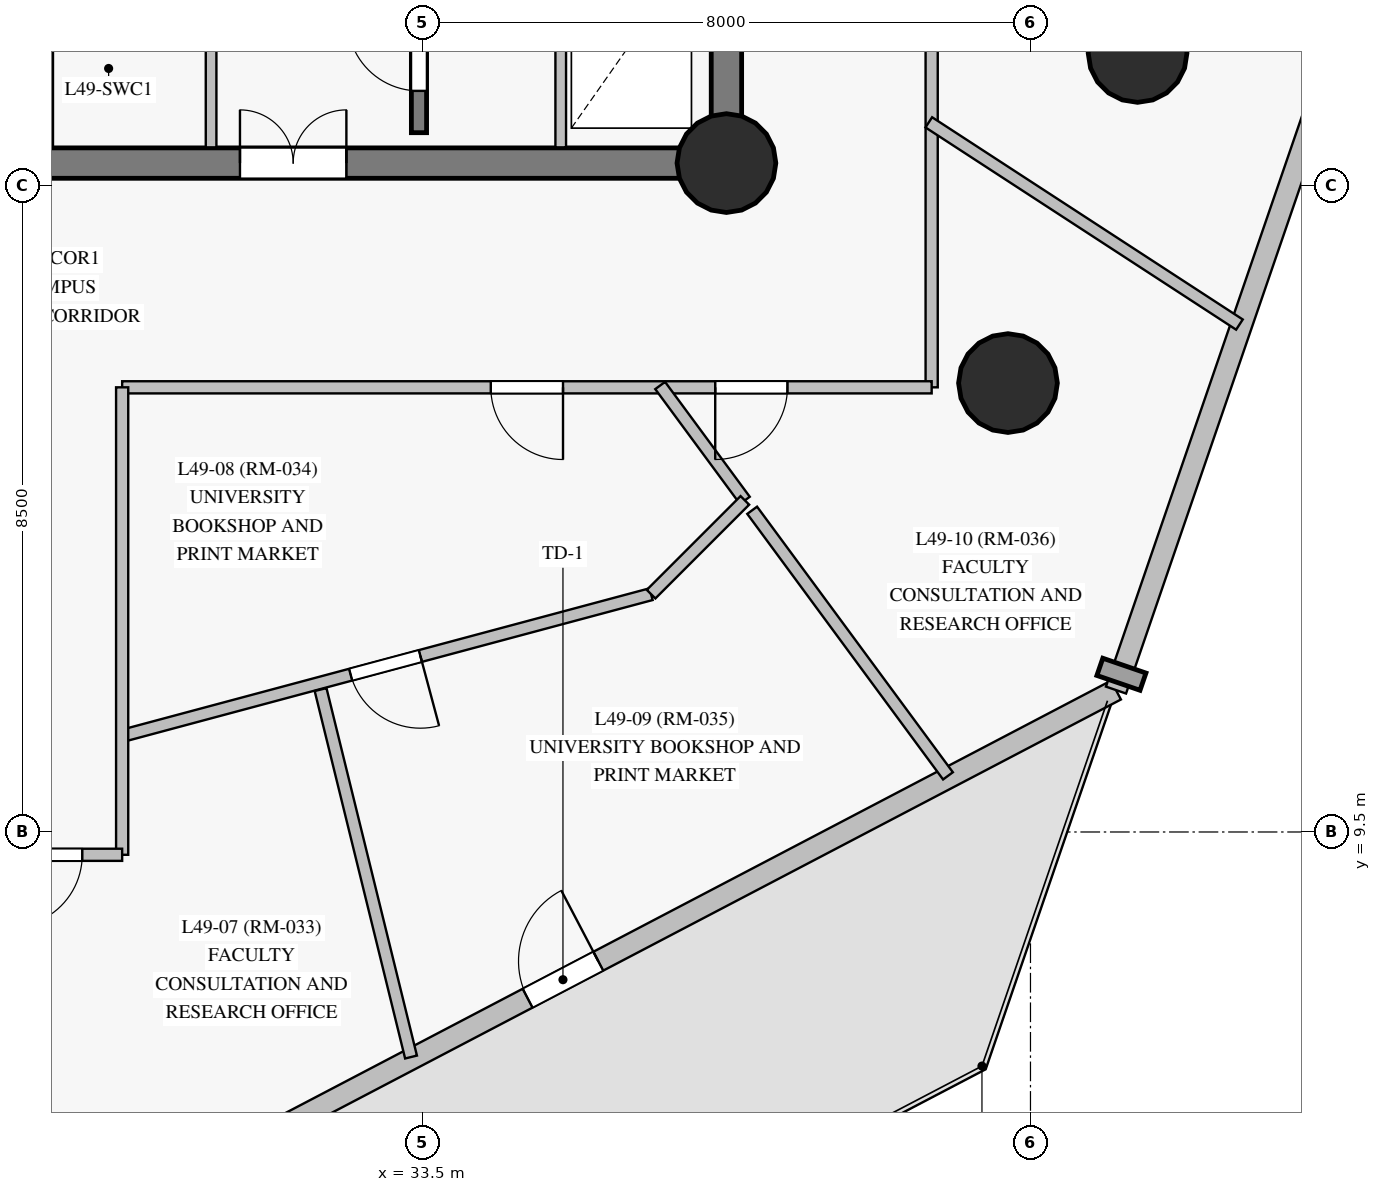
"""IFC4 building model, lengths in metres.
Left out: names, types, materials, properties, quantities, classifications, styles, units other than length and angle.
Written with IfcOpenShell. Run it as: python <this file> out.ifc"""

import sys

from ifc_helpers import new_model, si_unit, direction, frame, frame_2d, origin, origin_with_axes, origin_2d, place, context, subcontext, project, spatial, rectangle, circle, extrude, source, transform, mapped, element, fill, save


model = new_model("IFC4")
c1 = context("Model", 3, precision=1e-05, world=origin(), true_north=direction((0.0, 1.0)))
c2 = subcontext(c1, "Body", "Model", "MODEL_VIEW")
j1 = project(units=[si_unit("LENGTHUNIT", "METRE"), si_unit("PLANEANGLEUNIT", "RADIAN")], contexts=[c1])
p1 = place(None, origin())
s1 = spatial("IfcSite", under=j1, at=p1, CompositionType="ELEMENT")
p2 = place(p1, origin())
s2 = spatial("IfcBuilding", under=s1, at=p2, CompositionType="ELEMENT")
p3 = place(p2, frame((0.0, 0.0, 171.8)))
s3 = spatial("IfcBuildingStorey", under=s2, at=p3, CompositionType="ELEMENT", Elevation=171.8)
p4 = place(p3, frame((26.55, 18.3, 0.0), z_axis=(0.0, 0.0, 1.0), x_axis=(1.0, 0.0, 0.0)))
e1 = element("IfcWall", 1, at=p4, inside=s3, PredefinedType="SHEAR", context=c2, shape_type="SweptSolid", body=[
    extrude(rectangle(XDim=10.95, YDim=0.4, at=frame_2d((5.475, 0.0))), origin(), (0.0, 0.0, 1.0), 2.825),
])
p5 = place(p4, frame((4.55, 0.0, 0.0)))
e2 = element("IfcOpeningElement", 2, at=p5, cuts=e1, PredefinedType="OPENING", context=c2, shape_type="SweptSolid", body=[
    extrude(rectangle(XDim=1.4, YDim=2.2, at=frame_2d((0.7, 1.1))), frame((0.0, 0.21, 0.0), z_axis=(0.0, -1.0, 0.0), x_axis=(1.0, 0.0, 0.0)), (0.0, 0.0, 1.0), 0.42),
])
p6 = place(p3, frame((37.5, 18.3, 0.0), z_axis=(0.0, 0.0, 1.0), x_axis=(0.0, 1.0, 0.0)))
e3 = element("IfcWall", 3, at=p6, inside=s3, PredefinedType="SHEAR", context=c2, shape_type="SweptSolid", body=[
    extrude(rectangle(XDim=16.4, YDim=0.4, at=frame_2d((8.2, 0.0))), origin(), (0.0, 0.0, 1.0), 2.825),
])
p7 = place(p6, frame((14.15, 0.0, 0.0)))
e4 = element("IfcOpeningElement", 4, at=p7, cuts=e3, PredefinedType="OPENING", context=c2, shape_type="SweptSolid", body=[
    extrude(rectangle(XDim=1.2, YDim=2.15, at=frame_2d((0.6, 1.075))), frame((0.0, 0.21, 0.0), z_axis=(0.0, -1.0, 0.0), x_axis=(1.0, 0.0, 0.0)), (0.0, 0.0, 1.0), 0.42),
])
m1 = source(origin_with_axes(), c2, "Body", "SweptSolid", [
    extrude(circle(Radius=0.65, at=origin_2d()), origin(), (0.0, 0.0, 1.0), 3.05),
])
for number, where, z_axis, x_axis in (
    (5, (37.5, 18.3, 0.0), (0.0, 0.0, 1.0), (1.0, 0.0, 0.0)),
    (6, (42.909, 19.749, 0.0), (0.0, 0.0, 1.0), (1.0, 0.0, 0.0)),
    (7, (41.204, 15.406, 0.0), (0.0, 0.0, 1.0), (1.0, 0.0, 0.0)),
):
    element("IfcColumn", number, at=place(p3, frame(where, z_axis=z_axis, x_axis=x_axis)), inside=s3, PredefinedType="COLUMN", context=c2, shape_type="MappedRepresentation", body=[
        mapped(m1, transform((0.0, 0.0, 0.0), scale=1.0)),
    ])
p8 = place(p3, frame((26.751, 3.054, 0.0), z_axis=(0.0, 0.0, 1.0), x_axis=(0.885874198796, 0.463925537029, 0.0)))
e8 = element("IfcWall", 8, at=p8, inside=s3, PredefinedType="SOLIDWALL", context=c2, shape_type="SweptSolid", body=[
    extrude(rectangle(XDim=17.919, YDim=0.28, at=frame_2d((8.96, 0.0))), origin(), (0.0, 0.0, 1.0), 2.495),
])
p9 = place(p8, frame((9.181, 0.0, 0.0)))
e9 = element("IfcOpeningElement", 9, at=p9, cuts=e8, PredefinedType="OPENING", context=c2, shape_type="SweptSolid", body=[
    extrude(rectangle(XDim=1.05, YDim=2.12, at=frame_2d((0.525, 1.06))), frame((0.0, 0.15, 0.0), z_axis=(0.0, -1.0, 0.0), x_axis=(1.0, 0.0, 0.0)), (0.0, 0.0, 1.0), 0.3),
])
p10 = place(p3, frame((42.625, 11.367, 0.0), z_axis=(0.0, 0.0, 1.0), x_axis=(0.324982030771, 0.945720191006, 0.0)))
e10 = element("IfcWall", 10, at=p10, inside=s3, PredefinedType="SOLIDWALL", context=c2, shape_type="SweptSolid", body=[
    extrude(rectangle(XDim=8.796, YDim=0.28, at=frame_2d((4.398, 0.0))), origin(), (0.0, 0.0, 1.0), 2.495),
])
p11 = place(p3, frame((33.455, 18.7, 0.0), z_axis=(0.0, 0.0, 1.0), x_axis=(0.0, 1.0, 0.0)))
e11 = element("IfcWall", 11, at=p11, inside=s3, PredefinedType="SHEAR", context=c2, shape_type="SweptSolid", body=[
    extrude(rectangle(XDim=15.6, YDim=0.2, at=frame_2d((7.8, 0.0))), origin(), (0.0, 0.0, 1.0), 2.825),
])
p12 = place(p11, frame((2.75, 0.0, 0.0)))
e12 = element("IfcOpeningElement", 12, at=p12, cuts=e11, PredefinedType="OPENING", context=c2, shape_type="SweptSolid", body=[
    extrude(rectangle(XDim=1.15, YDim=2.15, at=frame_2d((0.575, 1.075))), frame((0.0, 0.11, 0.0), z_axis=(0.0, -1.0, 0.0), x_axis=(1.0, 0.0, 0.0)), (0.0, 0.0, 1.0), 0.22),
])
p13 = place(p11, frame((0.55, 0.0, 0.0)))
e13 = element("IfcOpeningElement", 13, at=p13, cuts=e11, PredefinedType="OPENING", context=c2, shape_type="SweptSolid", body=[
    extrude(rectangle(XDim=0.94, YDim=2.1, at=frame_2d((0.47, 1.05))), frame((0.0, 0.11, 0.0), z_axis=(0.0, -1.0, 0.0), x_axis=(1.0, 0.0, 0.0)), (0.0, 0.0, 1.0), 0.22),
])
p14 = place(p3, frame((40.2, 37.65, 0.0), z_axis=(0.0, 0.0, 1.0), x_axis=(0.0, -1.0, 0.0)))
e14 = element("IfcWall", 14, at=p14, inside=s3, PredefinedType="PARTITIONING", context=c2, shape_type="SweptSolid", body=[
    extrude(rectangle(XDim=22.3, YDim=0.16, at=frame_2d((11.15, 0.0))), origin(), (0.0, 0.0, 1.0), 2.375),
])
p15 = place(p14, frame((14.02, 0.0, 0.0)))
e15 = element("IfcOpeningElement", 15, at=p15, cuts=e14, PredefinedType="OPENING", context=c2, shape_type="SweptSolid", body=[
    extrude(rectangle(XDim=0.95, YDim=2.15, at=frame_2d((0.475, 1.075))), frame((0.0, 0.09, 0.0), z_axis=(0.0, -1.0, 0.0), x_axis=(1.0, 0.0, 0.0)), (0.0, 0.0, 1.0), 0.18),
])
p16 = place(p14, frame((10.675, 0.0, 0.0)))
e16 = element("IfcOpeningElement", 16, at=p16, cuts=e14, PredefinedType="OPENING", context=c2, shape_type="SweptSolid", body=[
    extrude(rectangle(XDim=0.95, YDim=2.15, at=frame_2d((0.475, 1.075))), frame((0.0, 0.09, 0.0), z_axis=(0.0, -1.0, 0.0), x_axis=(1.0, 0.0, 0.0)), (0.0, 0.0, 1.0), 0.18),
])
p17 = place(p14, frame((7.33, 0.0, 0.0)))
e17 = element("IfcOpeningElement", 17, at=p17, cuts=e14, PredefinedType="OPENING", context=c2, shape_type="SweptSolid", body=[
    extrude(rectangle(XDim=0.95, YDim=2.15, at=frame_2d((0.475, 1.075))), frame((0.0, 0.09, 0.0), z_axis=(0.0, -1.0, 0.0), x_axis=(1.0, 0.0, 0.0)), (0.0, 0.0, 1.0), 0.18),
])
p18 = place(p3, frame((40.2, 15.35, 0.0), z_axis=(0.0, 0.0, 1.0), x_axis=(-1.0, 0.0, 0.0)))
e18 = element("IfcWall", 18, at=p18, inside=s3, PredefinedType="PARTITIONING", context=c2, shape_type="SweptSolid", body=[
    extrude(rectangle(XDim=10.65, YDim=0.16, at=frame_2d((5.325, 0.0))), origin(), (0.0, 0.0, 1.0), 2.275),
])
p19 = place(p18, frame((4.85, 0.0, 0.0)))
e19 = element("IfcOpeningElement", 19, at=p19, cuts=e18, PredefinedType="OPENING", context=c2, shape_type="SweptSolid", body=[
    extrude(rectangle(XDim=0.95, YDim=2.15, at=frame_2d((0.475, 1.075))), frame((0.0, 0.09, 0.0), z_axis=(0.0, -1.0, 0.0), x_axis=(1.0, 0.0, 0.0)), (0.0, 0.0, 1.0), 0.18),
])
p20 = place(p18, frame((1.897, 0.0, 0.0)))
e20 = element("IfcOpeningElement", 20, at=p20, cuts=e18, PredefinedType="OPENING", context=c2, shape_type="SweptSolid", body=[
    extrude(rectangle(XDim=0.95, YDim=2.15, at=frame_2d((0.475, 1.075))), frame((0.0, 0.09, 0.0), z_axis=(0.0, -1.0, 0.0), x_axis=(1.0, 0.0, 0.0)), (0.0, 0.0, 1.0), 0.18),
])
p21 = place(p3, frame((36.509, 12.629, 0.0), z_axis=(0.0, 0.0, 1.0), x_axis=(-0.965925605542, -0.258819868939, 0.0)))
e21 = element("IfcWall", 21, at=p21, inside=s3, PredefinedType="PARTITIONING", context=c2, shape_type="SweptSolid", body=[
    extrude(rectangle(XDim=7.234, YDim=0.16, at=frame_2d((3.617, 0.0))), origin(), (0.0, 0.0, 1.0), 2.275),
])
p22 = place(p21, frame((3.142, 0.0, 0.0)))
e22 = element("IfcOpeningElement", 22, at=p22, cuts=e21, PredefinedType="OPENING", context=c2, shape_type="SweptSolid", body=[
    extrude(rectangle(XDim=0.95, YDim=2.15, at=frame_2d((0.475, 1.075))), frame((0.0, 0.09, 0.0), z_axis=(0.0, -1.0, 0.0), x_axis=(1.0, 0.0, 0.0)), (0.0, 0.0, 1.0), 0.18),
])
p23 = place(p3, frame((29.55, 15.35, 0.0), z_axis=(0.0, 0.0, 1.0), x_axis=(0.0, -1.0, 0.0)))
e23 = element("IfcWall", 23, at=p23, inside=s3, PredefinedType="PARTITIONING", context=c2, shape_type="SweptSolid", body=[
    extrude(rectangle(XDim=6.15, YDim=0.16, at=frame_2d((3.075, 0.0))), origin(), (0.0, 0.0, 1.0), 2.825),
])
p24 = place(p3, frame((32.161, 11.374, 0.0), z_axis=(0.0, 0.0, 1.0), x_axis=(0.238968541019, -0.971027309813, 0.0)))
e24 = element("IfcWall", 24, at=p24, inside=s3, PredefinedType="PARTITIONING", context=c2, shape_type="SweptSolid", body=[
    extrude(rectangle(XDim=4.979, YDim=0.16, at=frame_2d((2.489, 0.0))), origin(), (0.0, 0.0, 1.0), 2.825),
])
p25 = place(p3, frame((40.162, 18.836, 0.0), z_axis=(0.0, 0.0, 1.0), x_axis=(0.838039609879, -0.545609395332, 0.0)))
e25 = element("IfcWall", 25, at=p25, inside=s3, PredefinedType="PARTITIONING", context=c2, shape_type="SweptSolid", body=[
    extrude(rectangle(XDim=4.876, YDim=0.16, at=frame_2d((2.438, 0.0))), origin(), (0.0, 0.0, 1.0), 2.825),
])
p26 = place(p3, frame((37.839, 13.732, 0.0), z_axis=(0.0, 0.0, 1.0), x_axis=(0.593392782783, -0.804913042099, 0.0)))
e26 = element("IfcWall", 26, at=p26, inside=s3, PredefinedType="PARTITIONING", context=c2, shape_type="SweptSolid", body=[
    extrude(rectangle(XDim=4.341, YDim=0.16, at=frame_2d((2.17, 0.0))), origin(), (0.0, 0.0, 1.0), 2.825),
])
p27 = place(p3, frame((30.72, 18.507, 0.0), z_axis=(0.0, 0.0, 1.0), x_axis=(0.0, 1.0, 0.0)))
e27 = element("IfcWall", 27, at=p27, inside=s3, PredefinedType="PARTITIONING", context=c2, shape_type="SweptSolid", body=[
    extrude(rectangle(XDim=2.733, YDim=0.14, at=frame_2d((1.366, 0.0))), origin(), (0.0, 0.0, 1.0), 2.825),
])
p28 = place(p3, frame((28.58, 18.507, 0.0), z_axis=(0.0, 0.0, 1.0), x_axis=(0.0, 1.0, 0.0)))
e28 = element("IfcWall", 28, at=p28, inside=s3, PredefinedType="PARTITIONING", context=c2, shape_type="SweptSolid", body=[
    extrude(rectangle(XDim=2.662, YDim=0.12, at=frame_2d((1.331, 0.0))), origin(), (0.0, 0.0, 1.0), 2.825),
])
p29 = place(p3, frame((35.32, 18.507, 0.0), z_axis=(0.0, 0.0, 1.0), x_axis=(0.0, 1.0, 0.0)))
e29 = element("IfcWall", 29, at=p29, inside=s3, PredefinedType="PARTITIONING", context=c2, shape_type="SweptSolid", body=[
    extrude(rectangle(XDim=2.604, YDim=0.14, at=frame_2d((1.302, 0.0))), origin(), (0.0, 0.0, 1.0), 2.825),
])
p30 = place(p3, frame((29.55, 9.2, 0.0), z_axis=(0.0, 0.0, 1.0), x_axis=(-1.0, 0.0, 0.0)))
e30 = element("IfcWall", 30, at=p30, inside=s3, PredefinedType="PARTITIONING", context=c2, shape_type="SweptSolid", body=[
    extrude(rectangle(XDim=2.0, YDim=0.16, at=frame_2d((1.0, 0.0))), origin(), (0.0, 0.0, 1.0), 2.495),
])
p31 = place(p30, frame((0.525, 0.0, 0.0)))
e31 = element("IfcOpeningElement", 31, at=p31, cuts=e30, PredefinedType="OPENING", context=c2, shape_type="SweptSolid", body=[
    extrude(rectangle(XDim=0.95, YDim=2.15, at=frame_2d((0.475, 1.075))), frame((0.0, 0.09, 0.0), z_axis=(0.0, -1.0, 0.0), x_axis=(1.0, 0.0, 0.0)), (0.0, 0.0, 1.0), 0.18),
])
p32 = place(p3, frame((36.628, 15.374, 0.0), z_axis=(0.0, 0.0, 1.0), x_axis=(0.593385290423, -0.804918565514, 0.0)))
e32 = element("IfcWall", 32, at=p32, inside=s3, PredefinedType="PARTITIONING", context=c2, shape_type="SweptSolid", body=[
    extrude(rectangle(XDim=1.878, YDim=0.16, at=frame_2d((0.939, 0.0))), origin(), (0.0, 0.0, 1.0), 2.825),
])
p33 = place(p3, frame((37.742, 13.863, 0.0), z_axis=(0.0, 0.0, 1.0), x_axis=(-0.707106781187, -0.707106781187, 0.0)))
e33 = element("IfcWall", 33, at=p33, inside=s3, PredefinedType="PARTITIONING", context=c2, shape_type="SweptSolid", body=[
    extrude(rectangle(XDim=1.745, YDim=0.16, at=frame_2d((0.873, 0.0))), origin(), (0.0, 0.0, 1.0), 2.275),
])
m2 = source(origin_with_axes(), c2, "Body", "SweptSolid", [
    extrude(rectangle(XDim=1.05, YDim=2.12, at=frame_2d((0.525, 1.06))), frame((0.0, 0.025, 0.0), z_axis=(0.0, -1.0, 0.0), x_axis=(1.0, 0.0, 0.0)), (0.0, 0.0, 1.0), 0.05),
])
p34 = place(p9, origin())
e34 = element("IfcDoor", 34, at=p34, inside=s3, OperationType="SINGLE_SWING_RIGHT", PredefinedType="DOOR", context=c2, shape_type="MappedRepresentation", body=[
    mapped(m2, transform((0.0, 0.0, 0.0), scale=1.0)),
])
fill(e9, e34)
m3 = source(origin_with_axes(), c2, "Body", "SweptSolid", [
    extrude(rectangle(XDim=1.4, YDim=2.2, at=frame_2d((0.7, 1.1))), frame((0.0, 0.025, 0.0), z_axis=(0.0, -1.0, 0.0), x_axis=(1.0, 0.0, 0.0)), (0.0, 0.0, 1.0), 0.05),
])
p35 = place(p5, origin())
e35 = element("IfcDoor", 35, at=p35, inside=s3, OperationType="DOUBLE_DOOR_SINGLE_SWING", PredefinedType="DOOR", context=c2, shape_type="MappedRepresentation", body=[
    mapped(m3, transform((0.0, 0.0, 0.0), scale=1.0)),
])
fill(e2, e35)
m4 = source(origin_with_axes(), c2, "Body", "SweptSolid", [
    extrude(rectangle(XDim=0.94, YDim=2.1, at=frame_2d((0.47, 1.05))), frame((0.0, 0.025, 0.0), z_axis=(0.0, -1.0, 0.0), x_axis=(1.0, 0.0, 0.0)), (0.0, 0.0, 1.0), 0.05),
])
p36 = place(p13, origin())
e36 = element("IfcDoor", 36, at=p36, inside=s3, OperationType="SINGLE_SWING_RIGHT", PredefinedType="DOOR", context=c2, shape_type="MappedRepresentation", body=[
    mapped(m4, transform((0.0, 0.0, 0.0), scale=1.0)),
])
fill(e13, e36)
m5 = source(origin_with_axes(), c2, "Body", "SweptSolid", [
    extrude(rectangle(XDim=0.95, YDim=2.15, at=frame_2d((0.475, 1.075))), frame((0.0, 0.025, 0.0), z_axis=(0.0, -1.0, 0.0), x_axis=(1.0, 0.0, 0.0)), (0.0, 0.0, 1.0), 0.05),
])
p37 = place(p31, origin())
e37 = element("IfcDoor", 37, at=p37, inside=s3, OperationType="SINGLE_SWING_RIGHT", PredefinedType="DOOR", context=c2, shape_type="MappedRepresentation", body=[
    mapped(m5, transform((0.0, 0.0, 0.0), scale=1.0)),
])
fill(e31, e37)
p38 = place(p19, origin())
e38 = element("IfcDoor", 38, at=p38, inside=s3, OperationType="SINGLE_SWING_LEFT", PredefinedType="DOOR", context=c2, shape_type="MappedRepresentation", body=[
    mapped(m5, transform((0.0, 0.0, 0.0), scale=1.0)),
])
fill(e19, e38)
p39 = place(p20, origin())
e39 = element("IfcDoor", 39, at=p39, inside=s3, OperationType="SINGLE_SWING_RIGHT", PredefinedType="DOOR", context=c2, shape_type="MappedRepresentation", body=[
    mapped(m5, transform((0.0, 0.0, 0.0), scale=1.0)),
])
fill(e20, e39)
p40 = place(p22, origin())
e40 = element("IfcDoor", 40, at=p40, inside=s3, OperationType="SINGLE_SWING_LEFT", PredefinedType="DOOR", context=c2, shape_type="MappedRepresentation", body=[
    mapped(m5, transform((0.0, 0.0, 0.0), scale=1.0)),
])
fill(e22, e40)
save(model, sys.argv[1])
